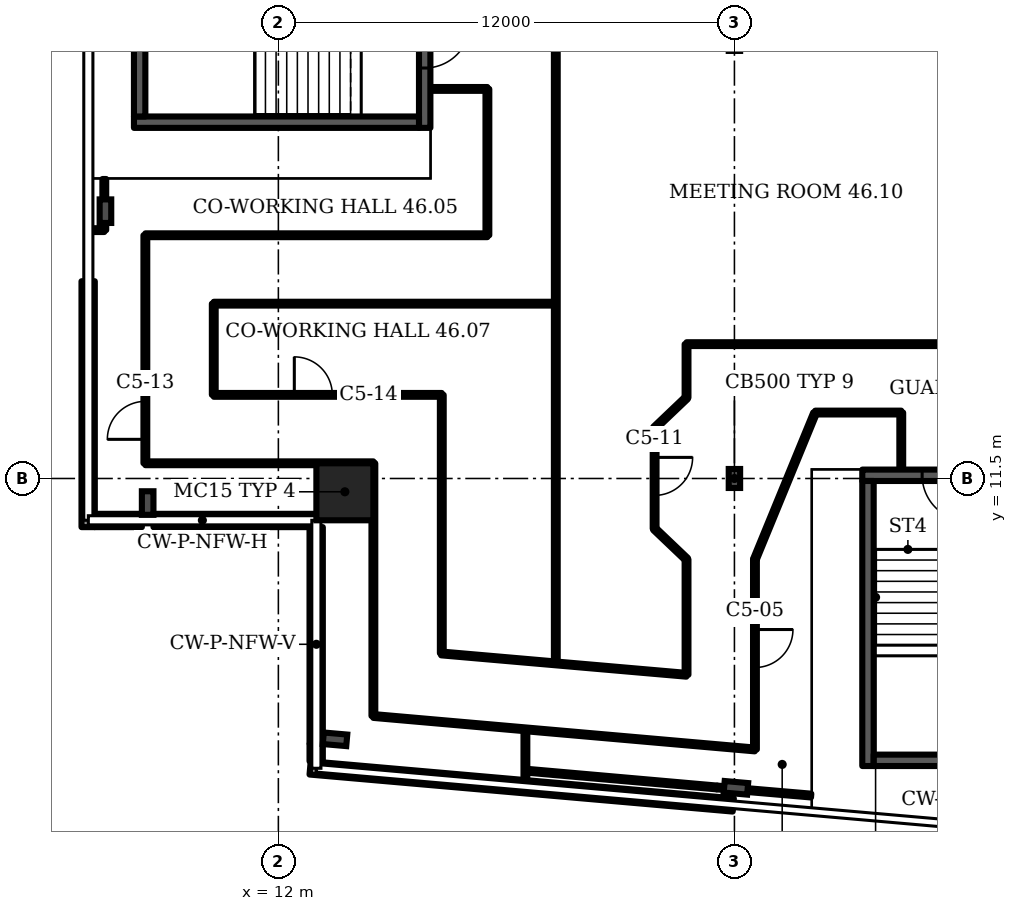
"""IFC4 building model, lengths in metres.
Left out: names, types, materials, properties, quantities, classifications, styles, units other than length and angle.
Written with IfcOpenShell. Run it as: python <this file> out.ifc"""

import sys

from ifc_helpers import new_model, si_unit, direction, frame, frame_2d, origin, origin_2d, place, context, subcontext, project, spatial, rectangle, i_section, extrude, element, fill, save


model = new_model("IFC4")
c1 = context("Model", 3, precision=1e-05, world=origin(), true_north=direction((0.0, 1.0)))
c2 = subcontext(c1, "Body", "Model", "MODEL_VIEW")
j1 = project(units=[si_unit("LENGTHUNIT", "METRE"), si_unit("PLANEANGLEUNIT", "RADIAN")], contexts=[c1])
p1 = place(None, origin())
s1 = spatial("IfcSite", under=j1, at=p1, CompositionType="ELEMENT")
p2 = place(p1, origin())
s2 = spatial("IfcBuilding", under=s1, at=p2, CompositionType="ELEMENT")
p3 = place(p2, frame((0.0, 0.0, 187.9)))
s3 = spatial("IfcBuildingStorey", under=s2, at=p3, CompositionType="ELEMENT", Elevation=187.9)
p4 = place(p3, frame((13.75, 11.15, 0.0), z_axis=(0.0, 0.0, 1.0), x_axis=(1.0, 0.0, 0.0)))
e1 = element("IfcColumn", 1, at=p4, inside=s3, PredefinedType="COLUMN", context=c2, shape_type="SweptSolid", body=[
    extrude(rectangle(XDim=1.5, YDim=1.5, at=origin_2d()), origin(), (0.0, 0.0, 1.0), 3.6),
])
for number, where, z_axis, x_axis in (
    (2, (13.491, 4.637, 0.0), (0.0, 0.0, 1.0), (-0.087, -0.996, 0.0)),
    (3, (24.039, 3.361, 0.0), (0.0, 0.0, 1.0), (-0.087, -0.996, 0.0)),
    (4, (7.45, 18.533, 0.0), (0.0, 0.0, 1.0), (-1.0, 0.0, 0.0)),
    (5, (8.561, 10.854, 0.0), (0.0, 0.0, 1.0), (-1.0, 0.0, 0.0)),
):
    element("IfcColumn", number, at=place(p3, frame(where, z_axis=z_axis, x_axis=x_axis)), inside=s3, PredefinedType="COLUMN", context=c2, shape_type="SweptSolid", body=[
        extrude(i_section(OverallWidth=0.305, OverallDepth=0.62, WebThickness=0.021, FlangeThickness=0.04, FilletRadius=0.027, at=origin_2d()), origin(), (0.0, 0.0, 1.0), 3.6),
    ])
p5 = place(p3, frame((24.0, 11.5, 0.0), z_axis=(0.0, 0.0, 1.0), x_axis=(1.0, 0.0, 0.0)))
e6 = element("IfcColumn", 6, at=p5, inside=s3, PredefinedType="COLUMN", context=c2, shape_type="SweptSolid", body=[
    extrude(i_section(OverallWidth=0.3, OverallDepth=0.5, WebThickness=0.014, FlangeThickness=0.028, FilletRadius=0.027, at=origin_2d()), origin(), (0.0, 0.0, 1.0), 3.6),
])
p6 = place(p3, frame((12.835, 3.885, 0.0), z_axis=(0.0, 0.0, 1.0), x_axis=(0.996199, -0.087154, 0.0)))
e7 = element("IfcWall", 7, at=p6, inside=s3, PredefinedType="SOLIDWALL", context=c2, shape_type="SweptSolid", body=[
    extrude(rectangle(XDim=11.177, YDim=0.35, at=frame_2d((5.588, 0.0))), origin(), (0.0, 0.0, 1.0), 1.0),
])
p7 = place(p3, frame((6.995, 16.69, 0.0), z_axis=(0.0, 0.0, 1.0), x_axis=(0.0, -1.0, 0.0)))
e8 = element("IfcWall", 8, at=p7, inside=s3, PredefinedType="SOLIDWALL", context=c2, shape_type="SweptSolid", body=[
    extrude(rectangle(XDim=6.47, YDim=0.35, at=frame_2d((3.235, 0.0))), origin(), (0.0, 0.0, 1.0), 1.0),
])
p8 = place(p3, frame((7.17, 10.395, 0.0), z_axis=(0.0, 0.0, 1.0), x_axis=(1.0, 0.0, 0.0)))
e9 = element("IfcWall", 9, at=p8, inside=s3, PredefinedType="SOLIDWALL", context=c2, shape_type="SweptSolid", body=[
    extrude(rectangle(XDim=1.238, YDim=0.35, at=frame_2d((0.619, 0.0))), origin(), (0.0, 0.0, 1.0), 1.0),
])
p9 = place(p3, frame((8.713, 10.395, 0.0), z_axis=(0.0, 0.0, 1.0), x_axis=(1.0, 0.0, 0.0)))
e10 = element("IfcWall", 10, at=p9, inside=s3, PredefinedType="SOLIDWALL", context=c2, shape_type="SweptSolid", body=[
    extrude(rectangle(XDim=4.287, YDim=0.35, at=frame_2d((2.143, 0.0))), origin(), (0.0, 0.0, 1.0), 1.0),
])
p10 = place(p3, frame((12.995, 10.22, 0.0), z_axis=(0.0, 0.0, 1.0), x_axis=(0.0, -1.0, 0.0)))
e11 = element("IfcWall", 11, at=p10, inside=s3, PredefinedType="SOLIDWALL", context=c2, shape_type="SweptSolid", body=[
    extrude(rectangle(XDim=5.693, YDim=0.35, at=frame_2d((2.847, 0.0))), origin(), (0.0, 0.0, 1.0), 1.0),
])
p11 = place(p3, frame((12.995, 4.512, 0.0), z_axis=(0.0, 0.0, 1.0), x_axis=(0.0, -1.0, 0.0)))
e12 = element("IfcWall", 12, at=p11, inside=s3, PredefinedType="SOLIDWALL", context=c2, shape_type="SweptSolid", body=[
    extrude(rectangle(XDim=0.454, YDim=0.35, at=frame_2d((0.227, 0.0))), origin(), (0.0, 0.0, 1.0), 1.0),
])
p12 = place(p3, frame((15.85, 20.725, 0.0), z_axis=(0.0, 0.0, 1.0), x_axis=(0.0, 1.0, 0.0)))
e13 = element("IfcWall", 13, at=p12, inside=s3, PredefinedType="SHEAR", context=c2, shape_type="SweptSolid", body=[
    extrude(rectangle(XDim=4.35, YDim=0.3, at=frame_2d((2.175, 0.0))), origin(), (0.0, 0.0, 1.0), 3.2),
])
p13 = place(p12, frame((1.575, 0.0, 0.0)))
e14 = element("IfcOpeningElement", 14, at=p13, cuts=e13, PredefinedType="OPENING", context=c2, shape_type="SweptSolid", body=[
    extrude(rectangle(XDim=1.2, YDim=2.1, at=frame_2d((0.6, 1.05))), frame((0.0, 0.16, 0.0), z_axis=(0.0, -1.0, 0.0), x_axis=(1.0, 0.0, 0.0)), (0.0, 0.0, 1.0), 0.32),
])
p14 = place(p3, frame((27.364, 11.584, 0.0), z_axis=(0.0, 0.0, 1.0), x_axis=(1.0, 0.0, 0.0)))
e15 = element("IfcWall", 15, at=p14, inside=s3, PredefinedType="SHEAR", context=c2, shape_type="SweptSolid", body=[
    extrude(rectangle(XDim=4.35, YDim=0.3, at=frame_2d((2.175, 0.0))), origin(), (0.0, 0.0, 1.0), 3.2),
])
p15 = place(p14, frame((1.575, 0.0, 0.0)))
e16 = element("IfcOpeningElement", 16, at=p15, cuts=e15, PredefinedType="OPENING", context=c2, shape_type="SweptSolid", body=[
    extrude(rectangle(XDim=1.2, YDim=2.1, at=frame_2d((0.6, 1.05))), frame((0.0, 0.16, 0.0), z_axis=(0.0, -1.0, 0.0), x_axis=(1.0, 0.0, 0.0)), (0.0, 0.0, 1.0), 0.32),
])
p16 = place(p3, frame((7.02, 18.035, 0.0), z_axis=(0.0, 0.0, 1.0), x_axis=(1.0, 0.0, 0.0)))
e17 = element("IfcWall", 17, at=p16, inside=s3, PredefinedType="PARTITIONING", context=c2, shape_type="SweptSolid", body=[
    extrude(rectangle(XDim=0.4, YDim=0.1, at=frame_2d((0.2, 0.0))), origin(), (0.0, 0.0, 1.0), 3.2),
])
p17 = place(p3, frame((7.42, 18.035, 0.0), z_axis=(0.0, 0.0, 1.0), x_axis=(0.0, 1.0, 0.0)))
e18 = element("IfcWall", 18, at=p17, inside=s3, PredefinedType="PARTITIONING", context=c2, shape_type="SweptSolid", body=[
    extrude(rectangle(XDim=1.345, YDim=0.1, at=frame_2d((0.672, 0.0))), origin(), (0.0, 0.0, 1.0), 2.58),
])
p18 = place(p3, frame((8.5, 11.9, 0.0), z_axis=(0.0, 0.0, 1.0), x_axis=(0.0, 1.0, 0.0)))
e19 = element("IfcWall", 19, at=p18, inside=s3, PredefinedType="PARTITIONING", context=c2, shape_type="SweptSolid", body=[
    extrude(rectangle(XDim=6.0, YDim=0.1, at=frame_2d((3.0, 0.0))), origin(), (0.0, 0.0, 1.0), 3.2),
])
p19 = place(p18, frame((0.63, 0.0, 0.0)))
e20 = element("IfcOpeningElement", 20, at=p19, cuts=e19, PredefinedType="OPENING", context=c2, shape_type="SweptSolid", body=[
    extrude(rectangle(XDim=1.0, YDim=2.1, at=frame_2d((0.5, 1.05))), frame((0.0, 0.06, 0.0), z_axis=(0.0, -1.0, 0.0), x_axis=(1.0, 0.0, 0.0)), (0.0, 0.0, 1.0), 0.12),
])
p20 = place(p3, frame((8.5, 11.9, 0.0), z_axis=(0.0, 0.0, 1.0), x_axis=(1.0, 0.0, 0.0)))
e21 = element("IfcWall", 21, at=p20, inside=s3, PredefinedType="PARTITIONING", context=c2, shape_type="SweptSolid", body=[
    extrude(rectangle(XDim=6.0, YDim=0.1, at=frame_2d((3.0, 0.0))), origin(), (0.0, 0.0, 1.0), 3.2),
])
p21 = place(p3, frame((8.5, 17.9, 0.0), z_axis=(0.0, 0.0, 1.0), x_axis=(1.0, 0.0, 0.0)))
e22 = element("IfcWall", 22, at=p21, inside=s3, PredefinedType="PARTITIONING", context=c2, shape_type="SweptSolid", body=[
    extrude(rectangle(XDim=9.0, YDim=0.1, at=frame_2d((4.5, 0.0))), origin(), (0.0, 0.0, 1.0), 3.2),
])
p22 = place(p3, frame((10.3, 13.7, 0.0), z_axis=(0.0, 0.0, 1.0), x_axis=(0.0, 1.0, 0.0)))
e23 = element("IfcWall", 23, at=p22, inside=s3, PredefinedType="PARTITIONING", context=c2, shape_type="SweptSolid", body=[
    extrude(rectangle(XDim=2.4, YDim=0.1, at=frame_2d((1.2, 0.0))), origin(), (0.0, 0.0, 1.0), 3.2),
])
p23 = place(p3, frame((10.3, 13.7, 0.0), z_axis=(0.0, 0.0, 1.0), x_axis=(1.0, 0.0, 0.0)))
e24 = element("IfcWall", 24, at=p23, inside=s3, PredefinedType="PARTITIONING", context=c2, shape_type="SweptSolid", body=[
    extrude(rectangle(XDim=6.0, YDim=0.1, at=frame_2d((3.0, 0.0))), origin(), (0.0, 0.0, 1.0), 3.2),
])
p24 = place(p23, frame((2.12, 0.0, 0.0)))
e25 = element("IfcOpeningElement", 25, at=p24, cuts=e24, PredefinedType="OPENING", context=c2, shape_type="SweptSolid", body=[
    extrude(rectangle(XDim=1.0, YDim=2.1, at=frame_2d((0.5, 1.05))), frame((0.0, 0.06, 0.0), z_axis=(0.0, -1.0, 0.0), x_axis=(1.0, 0.0, 0.0)), (0.0, 0.0, 1.0), 0.12),
])
p25 = place(p3, frame((10.3, 16.1, 0.0), z_axis=(0.0, 0.0, 1.0), x_axis=(1.0, 0.0, 0.0)))
e26 = element("IfcWall", 26, at=p25, inside=s3, PredefinedType="PARTITIONING", context=c2, shape_type="SweptSolid", body=[
    extrude(rectangle(XDim=9.0, YDim=0.1, at=frame_2d((4.5, 0.0))), origin(), (0.0, 0.0, 1.0), 3.2),
])
p26 = place(p3, frame((14.5, 5.25, 0.0), z_axis=(0.0, 0.0, 1.0), x_axis=(0.0, 1.0, 0.0)))
e27 = element("IfcWall", 27, at=p26, inside=s3, PredefinedType="PARTITIONING", context=c2, shape_type="SweptSolid", body=[
    extrude(rectangle(XDim=6.65, YDim=0.1, at=frame_2d((3.325, 0.0))), origin(), (0.0, 0.0, 1.0), 3.2),
])
p27 = place(p3, frame((16.02, 21.75, 0.0), z_axis=(0.0, 0.0, 1.0), x_axis=(1.0, 0.0, 0.0)))
e28 = element("IfcWall", 28, at=p27, inside=s3, PredefinedType="PARTITIONING", context=c2, shape_type="SweptSolid", body=[
    extrude(rectangle(XDim=1.48, YDim=0.1, at=frame_2d((0.74, 0.0))), origin(), (0.0, 0.0, 1.0), 3.2),
])
p28 = place(p3, frame((16.3, 6.9, 0.0), z_axis=(0.0, 0.0, 1.0), x_axis=(0.0, 1.0, 0.0)))
e29 = element("IfcWall", 29, at=p28, inside=s3, PredefinedType="PARTITIONING", context=c2, shape_type="SweptSolid", body=[
    extrude(rectangle(XDim=6.8, YDim=0.1, at=frame_2d((3.4, 0.0))), origin(), (0.0, 0.0, 1.0), 3.2),
])
p29 = place(p3, frame((17.5, 17.9, 0.0), z_axis=(0.0, 0.0, 1.0), x_axis=(0.0, 1.0, 0.0)))
e30 = element("IfcWall", 30, at=p29, inside=s3, PredefinedType="PARTITIONING", context=c2, shape_type="SweptSolid", body=[
    extrude(rectangle(XDim=3.85, YDim=0.1, at=frame_2d((1.925, 0.0))), origin(), (0.0, 0.0, 1.0), 3.2),
])
p30 = place(p3, frame((18.5, 3.425, 0.0), z_axis=(0.0, 0.0, 1.0), x_axis=(0.0, 1.0, 0.0)))
e31 = element("IfcWall", 31, at=p30, inside=s3, PredefinedType="PARTITIONING", context=c2, shape_type="SweptSolid", body=[
    extrude(rectangle(XDim=1.475, YDim=0.1, at=frame_2d((0.737, 0.0))), origin(), (0.0, 0.0, 1.0), 2.58),
])
p31 = place(p3, frame((19.3, 6.705, 0.0), z_axis=(0.0, 0.0, 1.0), x_axis=(0.0, 1.0, 0.0)))
e32 = element("IfcWall", 32, at=p31, inside=s3, PredefinedType="PARTITIONING", context=c2, shape_type="SweptSolid", body=[
    extrude(rectangle(XDim=20.495, YDim=0.1, at=frame_2d((10.248, 0.0))), origin(), (0.0, 0.0, 1.0), 3.2),
])
p32 = place(p3, frame((21.9, 12.825, 0.0), z_axis=(0.0, 0.0, 1.0), x_axis=(0.724157, 0.689643, 0.0)))
e33 = element("IfcWall", 33, at=p32, inside=s3, PredefinedType="PARTITIONING", context=c2, shape_type="SweptSolid", body=[
    extrude(rectangle(XDim=1.16, YDim=0.1, at=frame_2d((0.58, 0.0))), origin(), (0.0, 0.0, 1.0), 3.2),
])
p33 = place(p3, frame((21.9, 10.175, 0.0), z_axis=(0.0, 0.0, 1.0), x_axis=(0.0, 1.0, 0.0)))
e34 = element("IfcWall", 34, at=p33, inside=s3, PredefinedType="PARTITIONING", context=c2, shape_type="SweptSolid", body=[
    extrude(rectangle(XDim=2.65, YDim=0.1, at=frame_2d((1.325, 0.0))), origin(), (0.0, 0.0, 1.0), 3.2),
])
p34 = place(p33, frame((0.88, 0.0, 0.0)))
e35 = element("IfcOpeningElement", 35, at=p34, cuts=e34, PredefinedType="OPENING", context=c2, shape_type="SweptSolid", body=[
    extrude(rectangle(XDim=1.0, YDim=2.1, at=frame_2d((0.5, 1.05))), frame((0.0, 0.06, 0.0), z_axis=(0.0, -1.0, 0.0), x_axis=(1.0, 0.0, 0.0)), (0.0, 0.0, 1.0), 0.12),
])
p35 = place(p3, frame((22.74, 9.375, 0.0), z_axis=(0.0, 0.0, 1.0), x_axis=(-0.724157, 0.689643, 0.0)))
e36 = element("IfcWall", 36, at=p35, inside=s3, PredefinedType="PARTITIONING", context=c2, shape_type="SweptSolid", body=[
    extrude(rectangle(XDim=1.16, YDim=0.1, at=frame_2d((0.58, 0.0))), origin(), (0.0, 0.0, 1.0), 3.2),
])
p36 = place(p3, frame((22.74, 6.335, 0.0), z_axis=(0.0, 0.0, 1.0), x_axis=(-0.996229, 0.086722, 0.0)))
e37 = element("IfcWall", 37, at=p36, inside=s3, PredefinedType="PARTITIONING", context=c2, shape_type="SweptSolid", body=[
    extrude(rectangle(XDim=6.478, YDim=0.1, at=frame_2d((3.239, 0.0))), origin(), (0.0, 0.0, 1.0), 3.2),
])
p37 = place(p3, frame((22.74, 6.335, 0.0), z_axis=(0.0, 0.0, 1.0), x_axis=(0.0, 1.0, 0.0)))
e38 = element("IfcWall", 38, at=p37, inside=s3, PredefinedType="PARTITIONING", context=c2, shape_type="SweptSolid", body=[
    extrude(rectangle(XDim=3.04, YDim=0.1, at=frame_2d((1.52, 0.0))), origin(), (0.0, 0.0, 1.0), 3.2),
])
p38 = place(p3, frame((22.74, 13.625, 0.0), z_axis=(0.0, 0.0, 1.0), x_axis=(0.0, 1.0, 0.0)))
e39 = element("IfcWall", 39, at=p38, inside=s3, PredefinedType="PARTITIONING", context=c2, shape_type="SweptSolid", body=[
    extrude(rectangle(XDim=1.41, YDim=0.1, at=frame_2d((0.705, 0.0))), origin(), (0.0, 0.0, 1.0), 3.2),
])
p39 = place(p3, frame((22.74, 15.035, 0.0), z_axis=(0.0, 0.0, 1.0), x_axis=(1.0, 0.0, 0.0)))
e40 = element("IfcWall", 40, at=p39, inside=s3, PredefinedType="PARTITIONING", context=c2, shape_type="SweptSolid", body=[
    extrude(rectangle(XDim=13.6, YDim=0.1, at=frame_2d((6.8, 0.0))), origin(), (0.0, 0.0, 1.0), 3.2),
])
p40 = place(p39, frame((10.51, 0.0, 0.0)))
e41 = element("IfcOpeningElement", 41, at=p40, cuts=e40, PredefinedType="OPENING", context=c2, shape_type="SweptSolid", body=[
    extrude(rectangle(XDim=1.0, YDim=2.1, at=frame_2d((0.5, 1.05))), frame((0.0, 0.06, 0.0), z_axis=(0.0, -1.0, 0.0), x_axis=(1.0, 0.0, 0.0)), (0.0, 0.0, 1.0), 0.12),
])
p41 = place(p3, frame((23.54, 3.37, 0.0), z_axis=(0.0, 0.0, 1.0), x_axis=(-0.996148, 0.087735, 0.0)))
e42 = element("IfcWall", 42, at=p41, inside=s3, PredefinedType="PARTITIONING", context=c2, shape_type="SweptSolid", body=[
    extrude(rectangle(XDim=5.014, YDim=0.1, at=frame_2d((2.507, 0.0))), origin(), (0.0, 0.0, 1.0), 2.58),
])
p42 = place(p3, frame((24.54, 9.375, 0.0), z_axis=(0.0, 0.0, 1.0), x_axis=(0.380187, 0.924914, 0.0)))
e43 = element("IfcWall", 43, at=p42, inside=s3, PredefinedType="PARTITIONING", context=c2, shape_type="SweptSolid", body=[
    extrude(rectangle(XDim=4.156, YDim=0.1, at=frame_2d((2.078, 0.0))), origin(), (0.0, 0.0, 1.0), 3.2),
])
p43 = place(p3, frame((24.54, 4.37, 0.0), z_axis=(0.0, 0.0, 1.0), x_axis=(0.0, 1.0, 0.0)))
e44 = element("IfcWall", 44, at=p43, inside=s3, PredefinedType="PARTITIONING", context=c2, shape_type="SweptSolid", body=[
    extrude(rectangle(XDim=5.005, YDim=0.1, at=frame_2d((2.502, 0.0))), origin(), (0.0, 0.0, 1.0), 3.2),
])
p44 = place(p43, frame((2.156, 0.0, 0.0)))
e45 = element("IfcOpeningElement", 45, at=p44, cuts=e44, PredefinedType="OPENING", context=c2, shape_type="SweptSolid", body=[
    extrude(rectangle(XDim=1.0, YDim=2.1, at=frame_2d((0.5, 1.05))), frame((0.0, 0.06, 0.0), z_axis=(0.0, -1.0, 0.0), x_axis=(1.0, 0.0, 0.0)), (0.0, 0.0, 1.0), 0.12),
])
p45 = place(p3, frame((24.54, 4.37, 0.0), z_axis=(0.0, 0.0, 1.0), x_axis=(-0.996178, 0.08739, 0.0)))
e46 = element("IfcWall", 46, at=p45, inside=s3, PredefinedType="PARTITIONING", context=c2, shape_type="SweptSolid", body=[
    extrude(rectangle(XDim=10.077, YDim=0.1, at=frame_2d((5.039, 0.0))), origin(), (0.0, 0.0, 1.0), 3.2),
])
p46 = place(p3, frame((26.019, 3.157, 0.0), z_axis=(0.0, 0.0, 1.0), x_axis=(-0.996317, 0.085749, 0.0)))
e47 = element("IfcWall", 47, at=p46, inside=s3, PredefinedType="PARTITIONING", context=c2, shape_type="SweptSolid", body=[
    extrude(rectangle(XDim=2.489, YDim=0.1, at=frame_2d((1.244, 0.0))), origin(), (0.0, 0.0, 1.0), 2.58),
])
p47 = place(p3, frame((26.125, 13.235, 0.0), z_axis=(0.0, 0.0, 1.0), x_axis=(1.0, 0.0, 0.0)))
e48 = element("IfcWall", 48, at=p47, inside=s3, PredefinedType="PARTITIONING", context=c2, shape_type="SweptSolid", body=[
    extrude(rectangle(XDim=2.265, YDim=0.1, at=frame_2d((1.132, 0.0))), origin(), (0.0, 0.0, 1.0), 3.2),
])
p48 = place(p3, frame((28.39, 11.754, 0.0), z_axis=(0.0, 0.0, 1.0), x_axis=(0.0, 1.0, 0.0)))
e49 = element("IfcWall", 49, at=p48, inside=s3, PredefinedType="PARTITIONING", context=c2, shape_type="SweptSolid", body=[
    extrude(rectangle(XDim=1.481, YDim=0.1, at=frame_2d((0.74, 0.0))), origin(), (0.0, 0.0, 1.0), 3.2),
])
p49 = place(p3, frame((8.2, 20.875, 0.0), z_axis=(0.0, 0.0, 1.0), x_axis=(1.0, 0.0, 0.0)))
e50 = element("IfcWall", 50, at=p49, inside=s3, PredefinedType="SHEAR", context=c2, shape_type="SweptSolid", body=[
    extrude(rectangle(XDim=7.5, YDim=0.3, at=frame_2d((3.75, 0.0))), origin(), (0.0, 0.0, 1.0), 3.2),
])
p50 = place(p3, frame((8.35, 21.025, 0.0), z_axis=(0.0, 0.0, 1.0), x_axis=(0.0, 1.0, 0.0)))
e51 = element("IfcWall", 51, at=p50, inside=s3, PredefinedType="SHEAR", context=c2, shape_type="SweptSolid", body=[
    extrude(rectangle(XDim=3.75, YDim=0.3, at=frame_2d((1.875, 0.0))), origin(), (0.0, 0.0, 1.0), 3.2),
])
p51 = place(p3, frame((27.514, 3.934, 0.0), z_axis=(0.0, 0.0, 1.0), x_axis=(0.0, 1.0, 0.0)))
e52 = element("IfcWall", 52, at=p51, inside=s3, PredefinedType="SHEAR", context=c2, shape_type="SweptSolid", body=[
    extrude(rectangle(XDim=7.5, YDim=0.3, at=frame_2d((3.75, 0.0))), origin(), (0.0, 0.0, 1.0), 3.2),
])
p52 = place(p3, frame((27.664, 4.084, 0.0), z_axis=(0.0, 0.0, 1.0), x_axis=(1.0, 0.0, 0.0)))
e53 = element("IfcWall", 53, at=p52, inside=s3, PredefinedType="SHEAR", context=c2, shape_type="SweptSolid", body=[
    extrude(rectangle(XDim=3.75, YDim=0.3, at=frame_2d((1.875, 0.0))), origin(), (0.0, 0.0, 1.0), 3.2),
])
p53 = place(p13, origin())
e54 = element("IfcDoor", 54, at=p53, inside=s3, OperationType="SINGLE_SWING_RIGHT", PredefinedType="DOOR", context=c2, shape_type="SweptSolid", body=[
    extrude(rectangle(XDim=1.2, YDim=2.1, at=frame_2d((0.6, 1.05))), frame((0.0, 0.025, 0.0), z_axis=(0.0, -1.0, 0.0), x_axis=(1.0, 0.0, 0.0)), (0.0, 0.0, 1.0), 0.05),
])
fill(e14, e54)
p54 = place(p15, origin())
e55 = element("IfcDoor", 55, at=p54, inside=s3, OperationType="SINGLE_SWING_RIGHT", PredefinedType="DOOR", context=c2, shape_type="SweptSolid", body=[
    extrude(rectangle(XDim=1.2, YDim=2.1, at=frame_2d((0.6, 1.05))), frame((0.0, 0.025, 0.0), z_axis=(0.0, -1.0, 0.0), x_axis=(1.0, 0.0, 0.0)), (0.0, 0.0, 1.0), 0.05),
])
fill(e16, e55)
p55 = place(p44, origin())
e56 = element("IfcDoor", 56, at=p55, inside=s3, OperationType="SINGLE_SWING_RIGHT", PredefinedType="DOOR", context=c2, shape_type="SweptSolid", body=[
    extrude(rectangle(XDim=1.0, YDim=2.1, at=frame_2d((0.5, 1.05))), frame((0.0, 0.025, 0.0), z_axis=(0.0, -1.0, 0.0), x_axis=(1.0, 0.0, 0.0)), (0.0, 0.0, 1.0), 0.05),
])
fill(e45, e56)
p56 = place(p34, origin())
e57 = element("IfcDoor", 57, at=p56, inside=s3, OperationType="SINGLE_SWING_RIGHT", PredefinedType="DOOR", context=c2, shape_type="SweptSolid", body=[
    extrude(rectangle(XDim=1.0, YDim=2.1, at=frame_2d((0.5, 1.05))), frame((0.0, 0.025, 0.0), z_axis=(0.0, -1.0, 0.0), x_axis=(1.0, 0.0, 0.0)), (0.0, 0.0, 1.0), 0.05),
])
fill(e35, e57)
p57 = place(p19, origin())
e58 = element("IfcDoor", 58, at=p57, inside=s3, OperationType="SINGLE_SWING_LEFT", PredefinedType="DOOR", context=c2, shape_type="SweptSolid", body=[
    extrude(rectangle(XDim=1.0, YDim=2.1, at=frame_2d((0.5, 1.05))), frame((0.0, 0.025, 0.0), z_axis=(0.0, -1.0, 0.0), x_axis=(1.0, 0.0, 0.0)), (0.0, 0.0, 1.0), 0.05),
])
fill(e20, e58)
p58 = place(p24, origin())
e59 = element("IfcDoor", 59, at=p58, inside=s3, OperationType="SINGLE_SWING_LEFT", PredefinedType="DOOR", context=c2, shape_type="SweptSolid", body=[
    extrude(rectangle(XDim=1.0, YDim=2.1, at=frame_2d((0.5, 1.05))), frame((0.0, 0.025, 0.0), z_axis=(0.0, -1.0, 0.0), x_axis=(1.0, 0.0, 0.0)), (0.0, 0.0, 1.0), 0.05),
])
fill(e25, e59)
save(model, sys.argv[1])
